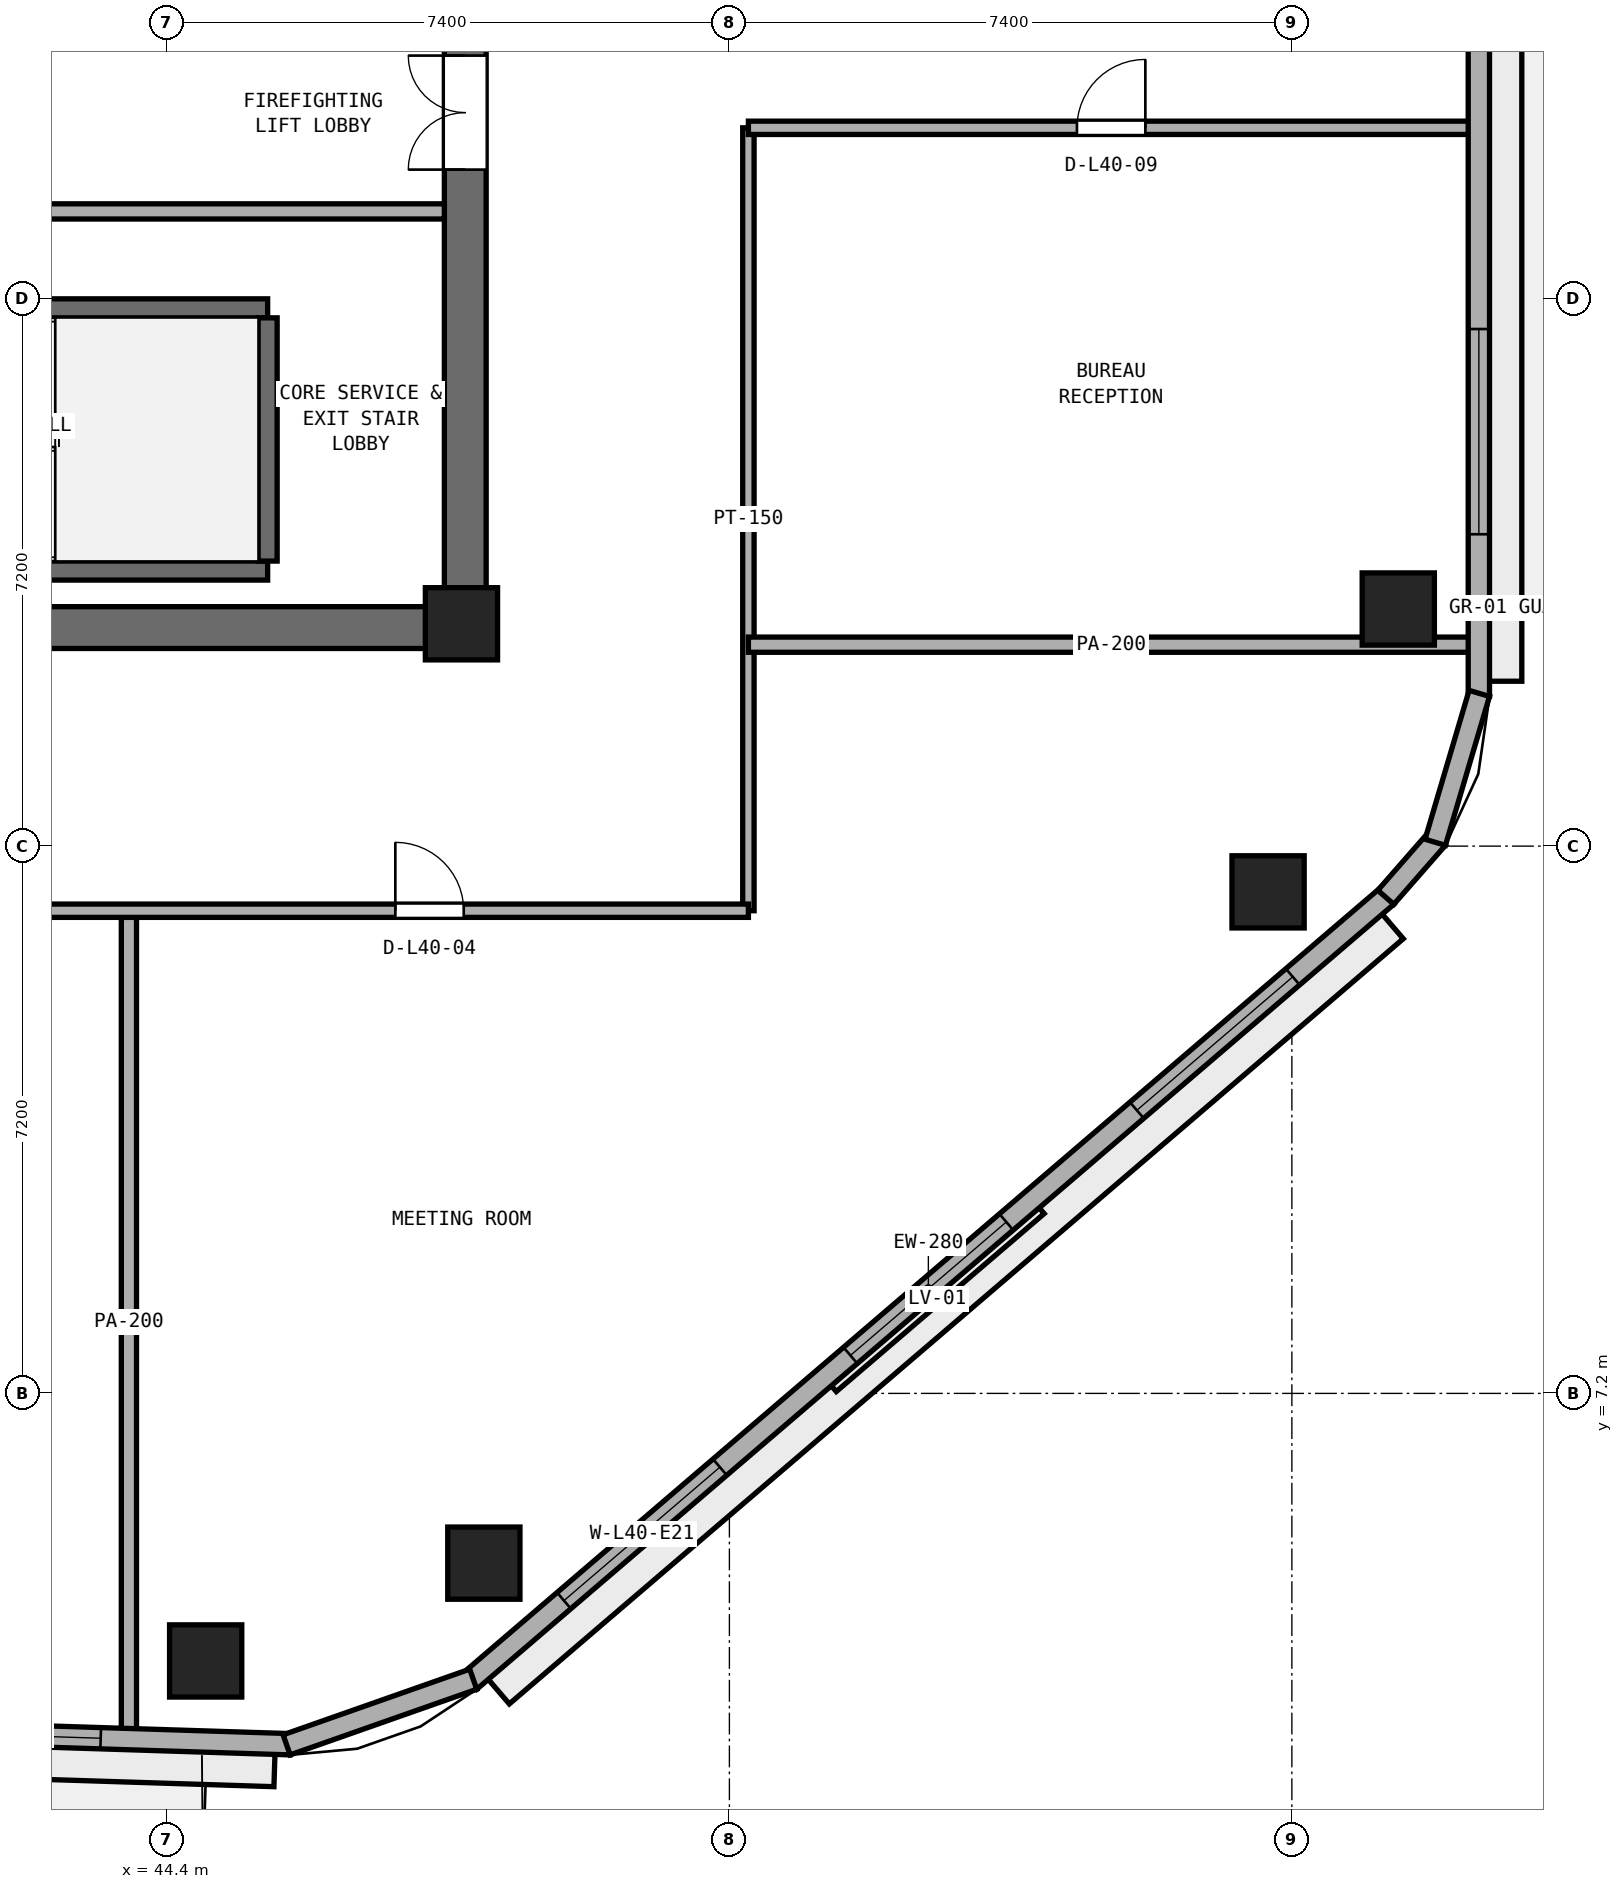
"""IFC4 building model, lengths in metres.
Left out: names, types, materials, properties, quantities, classifications, styles, units other than length and angle.
Written with IfcOpenShell. Run it as: python <this file> out.ifc"""

import sys

from ifc_helpers import new_model, si_unit, direction, frame, frame_2d, origin, origin_2d, place, context, subcontext, project, spatial, rectangle, extrude, element, fill, save


model = new_model("IFC4")
c1 = context("Model", 3, precision=1e-05, world=origin(), true_north=direction((0.0, 1.0)))
c2 = subcontext(c1, "Body", "Model", "MODEL_VIEW")
j1 = project(units=[si_unit("LENGTHUNIT", "METRE"), si_unit("PLANEANGLEUNIT", "RADIAN")], contexts=[c1])
p1 = place(None, origin())
s1 = spatial("IfcSite", under=j1, at=p1, CompositionType="ELEMENT")
p2 = place(p1, origin())
s2 = spatial("IfcBuilding", under=s1, at=p2, CompositionType="ELEMENT")
p3 = place(p2, frame((0.0, 0.0, 159.2)))
s3 = spatial("IfcBuildingStorey", under=s2, at=p3, CompositionType="ELEMENT", Elevation=159.2)
p4 = place(p3, frame((25.4, 17.275, 0.0), z_axis=(0.0, 0.0, 1.0), x_axis=(1.0, 0.0, 0.0)))
e1 = element("IfcWall", 1, at=p4, inside=s3, PredefinedType="SHEAR", context=c2, shape_type="SweptSolid", body=[
    extrude(rectangle(XDim=23.2, YDim=0.55, at=frame_2d((11.6, 0.0))), origin(), (0.0, 0.0, 1.0), 3.54),
])
p5 = place(p3, frame((48.325, 17.55, 0.0), z_axis=(0.0, 0.0, 1.0), x_axis=(0.0, 1.0, 0.0)))
e2 = element("IfcWall", 2, at=p5, inside=s3, PredefinedType="SHEAR", context=c2, shape_type="SweptSolid", body=[
    extrude(rectangle(XDim=15.3, YDim=0.55, at=frame_2d((7.65, 0.0))), origin(), (0.0, 0.0, 1.0), 3.54),
])
p6 = place(p5, frame((5.75, 0.0, 0.0)))
e3 = element("IfcOpeningElement", 3, at=p6, cuts=e2, PredefinedType="OPENING", context=c2, shape_type="SweptSolid", body=[
    extrude(rectangle(XDim=1.5, YDim=2.15, at=frame_2d((0.75, 1.075))), frame((0.0, 0.285, 0.0), z_axis=(0.0, -1.0, 0.0), x_axis=(1.0, 0.0, 0.0)), (0.0, 0.0, 1.0), 0.57),
])
p7 = place(p3, frame((48.275, 17.325, 0.0), z_axis=(0.0, 0.0, 1.0), x_axis=(1.0, 0.0, 0.0)))
e4 = element("IfcColumn", 4, at=p7, inside=s3, PredefinedType="PILASTER", context=c2, shape_type="SweptSolid", body=[
    extrude(rectangle(XDim=0.95, YDim=0.95, at=origin_2d()), origin(), (0.0, 0.0, 1.0), 3.8),
])
for number, where, z_axis, x_axis in (
    (5, (44.91, 3.68, 0.0), (0.0, 0.0, 1.0), (1.0, 0.0, 0.0)),
    (6, (48.57, 4.967, 0.0), (0.0, 0.0, 1.0), (1.0, 0.0, 0.0)),
    (7, (58.887, 13.798, 0.0), (0.0, 0.0, 1.0), (1.0, 0.0, 0.0)),
    (8, (60.6, 17.519, 0.0), (0.0, 0.0, 1.0), (1.0, 0.0, 0.0)),
):
    element("IfcColumn", number, at=place(p3, frame(where, z_axis=z_axis, x_axis=x_axis)), inside=s3, PredefinedType="COLUMN", context=c2, shape_type="SweptSolid", body=[
        extrude(rectangle(XDim=0.95, YDim=0.95, at=origin_2d()), origin(), (0.0, 0.0, 1.0), 3.8),
    ])
for number, where, z_axis, x_axis in (
    (9, (38.425, 18.025, 0.0), (0.0, 0.0, 1.0), (1.0, 0.0, 0.0)),
    (10, (38.425, 21.475, 0.0), (0.0, 0.0, 1.0), (1.0, 0.0, 0.0)),
):
    element("IfcWall", number, at=place(p3, frame(where, z_axis=z_axis, x_axis=x_axis)), inside=s3, PredefinedType="SHEAR", context=c2, shape_type="SweptSolid", body=[
        extrude(rectangle(XDim=7.3, YDim=0.25, at=frame_2d((3.65, 0.0))), origin(), (0.0, 0.0, 1.0), 3.54),
    ])
p8 = place(p3, frame((45.725, 18.15, 0.0), z_axis=(0.0, 0.0, 1.0), x_axis=(0.0, 1.0, 0.0)))
e11 = element("IfcWall", 11, at=p8, inside=s3, PredefinedType="SHEAR", context=c2, shape_type="SweptSolid", body=[
    extrude(rectangle(XDim=3.2, YDim=0.25, at=frame_2d((1.6, 0.0))), origin(), (0.0, 0.0, 1.0), 3.54),
])
p9 = place(p3, frame((42.0, 22.75, 0.0), z_axis=(0.0, 0.0, 1.0), x_axis=(1.0, 0.0, 0.0)))
e12 = element("IfcWall", 12, at=p9, inside=s3, PredefinedType="SOLIDWALL", context=c2, shape_type="SweptSolid", body=[
    extrude(rectangle(XDim=6.05, YDim=0.2, at=frame_2d((3.025, 0.0))), origin(), (0.0, 0.0, 1.0), 3.54),
])
p10 = place(p3, frame((52.05, 13.55, 0.0), z_axis=(0.0, 0.0, 1.0), x_axis=(0.0, 1.0, 0.0)))
e13 = element("IfcWall", 13, at=p10, inside=s3, PredefinedType="PARTITIONING", context=c2, shape_type="SweptSolid", body=[
    extrude(rectangle(XDim=10.3, YDim=0.15, at=frame_2d((5.15, 0.0))), origin(), (0.0, 0.0, 1.0), 3.54),
])
p11 = place(p3, frame((43.9, 2.717, 0.0), z_axis=(0.0, 0.0, 1.0), x_axis=(0.0, 1.0, 0.0)))
e14 = element("IfcWall", 14, at=p11, inside=s3, PredefinedType="PARTITIONING", context=c2, shape_type="SweptSolid", body=[
    extrude(rectangle(XDim=10.833, YDim=0.2, at=frame_2d((5.417, 0.0))), origin(), (0.0, 0.0, 1.0), 3.54),
])
p12 = place(p3, frame((21.95, 13.55, 0.0), z_axis=(0.0, 0.0, 1.0), x_axis=(1.0, 0.0, 0.0)))
e15 = element("IfcWall", 15, at=p12, inside=s3, PredefinedType="PARTITIONING", context=c2, shape_type="SweptSolid", body=[
    extrude(rectangle(XDim=30.1, YDim=0.175, at=frame_2d((15.05, 0.0))), origin(), (0.0, 0.0, 1.0), 3.54),
])
p13 = place(p12, frame((10.645, 0.0, 0.0)))
e16 = element("IfcOpeningElement", 16, at=p13, cuts=e15, PredefinedType="OPENING", context=c2, shape_type="SweptSolid", body=[
    extrude(rectangle(XDim=0.9, YDim=2.1, at=frame_2d((0.45, 1.05))), frame((0.0, 0.097, 0.0), z_axis=(0.0, -1.0, 0.0), x_axis=(1.0, 0.0, 0.0)), (0.0, 0.0, 1.0), 0.195),
])
p14 = place(p12, frame((25.455, 0.0, 0.0)))
e17 = element("IfcOpeningElement", 17, at=p14, cuts=e15, PredefinedType="OPENING", context=c2, shape_type="SweptSolid", body=[
    extrude(rectangle(XDim=0.9, YDim=2.1, at=frame_2d((0.45, 1.05))), frame((0.0, 0.097, 0.0), z_axis=(0.0, -1.0, 0.0), x_axis=(1.0, 0.0, 0.0)), (0.0, 0.0, 1.0), 0.195),
])
p15 = place(p3, frame((52.05, 17.05, 0.0), z_axis=(0.0, 0.0, 1.0), x_axis=(1.0, 0.0, 0.0)))
e18 = element("IfcWall", 18, at=p15, inside=s3, PredefinedType="PARTITIONING", context=c2, shape_type="SweptSolid", body=[
    extrude(rectangle(XDim=9.545, YDim=0.2, at=frame_2d((4.772, 0.0))), origin(), (0.0, 0.0, 1.0), 3.54),
])
p16 = place(p3, frame((52.05, 23.85, 0.0), z_axis=(0.0, 0.0, 1.0), x_axis=(1.0, 0.0, 0.0)))
e19 = element("IfcWall", 19, at=p16, inside=s3, PredefinedType="PARTITIONING", context=c2, shape_type="SweptSolid", body=[
    extrude(rectangle(XDim=9.545, YDim=0.175, at=frame_2d((4.772, 0.0))), origin(), (0.0, 0.0, 1.0), 3.54),
])
p17 = place(p16, frame((4.323, 0.0, 0.0)))
e20 = element("IfcOpeningElement", 20, at=p17, cuts=e19, PredefinedType="OPENING", context=c2, shape_type="SweptSolid", body=[
    extrude(rectangle(XDim=0.9, YDim=2.1, at=frame_2d((0.45, 1.05))), frame((0.0, 0.097, 0.0), z_axis=(0.0, -1.0, 0.0), x_axis=(1.0, 0.0, 0.0)), (0.0, 0.0, 1.0), 0.195),
])
p18 = place(p3, frame((29.625, 3.104, 0.0), z_axis=(0.0, 0.0, 1.0), x_axis=(0.99949718661, -0.031707632487, 0.0)))
e21 = element("IfcWall", 21, at=p18, inside=s3, PredefinedType="STANDARD", context=c2, shape_type="SweptSolid", body=[
    extrude(rectangle(XDim=16.408, YDim=0.28, at=frame_2d((8.204, 0.0))), origin(), (0.0, 0.0, 1.0), 3.54),
])
p19 = place(p18, frame((7.654, 0.0, 0.0)))
e22 = element("IfcOpeningElement", 22, at=p19, cuts=e21, PredefinedType="OPENING", context=c2, shape_type="SweptSolid", body=[
    extrude(rectangle(XDim=1.1, YDim=2.2, at=frame_2d((0.55, 1.1))), frame((0.0, 0.15, 0.0), z_axis=(0.0, -1.0, 0.0), x_axis=(1.0, 0.0, 0.0)), (0.0, 0.0, 1.0), 0.3),
])
p20 = place(p18, frame((1.718, 0.0, 0.9)))
e23 = element("IfcOpeningElement", 23, at=p20, cuts=e21, PredefinedType="OPENING", context=c2, shape_type="SweptSolid", body=[
    extrude(rectangle(XDim=2.7, YDim=1.75, at=frame_2d((1.35, 0.875))), frame((0.0, 0.15, 0.0), z_axis=(0.0, -1.0, 0.0), x_axis=(1.0, 0.0, 0.0)), (0.0, 0.0, 1.0), 0.3),
])
p21 = place(p18, frame((11.21, 0.0, 0.9)))
e24 = element("IfcOpeningElement", 24, at=p21, cuts=e21, PredefinedType="OPENING", context=c2, shape_type="SweptSolid", body=[
    extrude(rectangle(XDim=2.7, YDim=1.75, at=frame_2d((1.35, 0.875))), frame((0.0, 0.15, 0.0), z_axis=(0.0, -1.0, 0.0), x_axis=(1.0, 0.0, 0.0)), (0.0, 0.0, 1.0), 0.3),
])
p22 = place(p3, frame((48.385, 3.414, 0.0), z_axis=(0.0, 0.0, 1.0), x_axis=(0.759700260779, 0.650273414628, 0.0)))
e25 = element("IfcWall", 25, at=p22, inside=s3, PredefinedType="STANDARD", context=c2, shape_type="SweptSolid", body=[
    extrude(rectangle(XDim=15.881, YDim=0.28, at=frame_2d((7.94, 0.0))), origin(), (0.0, 0.0, 1.0), 3.54),
])
p23 = place(p22, frame((1.63, 0.0, 0.9)))
e26 = element("IfcOpeningElement", 26, at=p23, cuts=e25, PredefinedType="OPENING", context=c2, shape_type="SweptSolid", body=[
    extrude(rectangle(XDim=2.7, YDim=1.75, at=frame_2d((1.35, 0.875))), frame((0.0, 0.15, 0.0), z_axis=(0.0, -1.0, 0.0), x_axis=(1.0, 0.0, 0.0)), (0.0, 0.0, 1.0), 0.3),
])
p24 = place(p22, frame((6.59, 0.0, 0.9)))
e27 = element("IfcOpeningElement", 27, at=p24, cuts=e25, PredefinedType="OPENING", context=c2, shape_type="SweptSolid", body=[
    extrude(rectangle(XDim=2.7, YDim=1.75, at=frame_2d((1.35, 0.875))), frame((0.0, 0.15, 0.0), z_axis=(0.0, -1.0, 0.0), x_axis=(1.0, 0.0, 0.0)), (0.0, 0.0, 1.0), 0.3),
])
p25 = place(p22, frame((11.551, 0.0, 0.9)))
e28 = element("IfcOpeningElement", 28, at=p25, cuts=e25, PredefinedType="OPENING", context=c2, shape_type="SweptSolid", body=[
    extrude(rectangle(XDim=2.7, YDim=1.75, at=frame_2d((1.35, 0.875))), frame((0.0, 0.15, 0.0), z_axis=(0.0, -1.0, 0.0), x_axis=(1.0, 0.0, 0.0)), (0.0, 0.0, 1.0), 0.3),
])
p26 = place(p3, frame((61.66, 16.369, 0.0), z_axis=(0.0, 0.0, 1.0), x_axis=(0.0, 1.0, 0.0)))
e29 = element("IfcWall", 29, at=p26, inside=s3, PredefinedType="STANDARD", context=c2, shape_type="SweptSolid", body=[
    extrude(rectangle(XDim=18.902, YDim=0.28, at=frame_2d((9.451, 0.0))), origin(), (0.0, 0.0, 1.0), 3.54),
])
p27 = place(p26, frame((8.601, 0.0, 0.0)))
e30 = element("IfcOpeningElement", 30, at=p27, cuts=e29, PredefinedType="OPENING", context=c2, shape_type="SweptSolid", body=[
    extrude(rectangle(XDim=1.1, YDim=2.2, at=frame_2d((0.55, 1.1))), frame((0.0, 0.15, 0.0), z_axis=(0.0, -1.0, 0.0), x_axis=(1.0, 0.0, 0.0)), (0.0, 0.0, 1.0), 0.3),
])
p28 = place(p26, frame((2.134, 0.0, 0.9)))
e31 = element("IfcOpeningElement", 31, at=p28, cuts=e29, PredefinedType="OPENING", context=c2, shape_type="SweptSolid", body=[
    extrude(rectangle(XDim=2.7, YDim=1.75, at=frame_2d((1.35, 0.875))), frame((0.0, 0.15, 0.0), z_axis=(0.0, -1.0, 0.0), x_axis=(1.0, 0.0, 0.0)), (0.0, 0.0, 1.0), 0.3),
])
p29 = place(p26, frame((14.069, 0.0, 0.9)))
e32 = element("IfcOpeningElement", 32, at=p29, cuts=e29, PredefinedType="OPENING", context=c2, shape_type="SweptSolid", body=[
    extrude(rectangle(XDim=2.7, YDim=1.75, at=frame_2d((1.35, 0.875))), frame((0.0, 0.15, 0.0), z_axis=(0.0, -1.0, 0.0), x_axis=(1.0, 0.0, 0.0)), (0.0, 0.0, 1.0), 0.3),
])
p30 = place(p3, frame((45.975, 2.576, 0.0), z_axis=(0.0, 0.0, 1.0), x_axis=(0.943377643365, 0.331720698781, 0.0)))
e33 = element("IfcWall", 33, at=p30, inside=s3, PredefinedType="STANDARD", context=c2, shape_type="SweptSolid", body=[
    extrude(rectangle(XDim=2.603, YDim=0.28, at=frame_2d((1.301, 0.0))), origin(), (0.0, 0.0, 1.0), 3.54),
])
p31 = place(p3, frame((60.436, 13.727, 0.0), z_axis=(0.0, 0.0, 1.0), x_axis=(0.658571618609, 0.752518055041, 0.0)))
e34 = element("IfcWall", 34, at=p31, inside=s3, PredefinedType="STANDARD", context=c2, shape_type="SweptSolid", body=[
    extrude(rectangle(XDim=1.032, YDim=0.28, at=frame_2d((0.516, 0.0))), origin(), (0.0, 0.0, 1.0), 3.54),
])
p32 = place(p3, frame((61.086, 14.45, 0.0), z_axis=(0.0, 0.0, 1.0), x_axis=(0.283660953453, 0.958924639107, 0.0)))
e35 = element("IfcWall", 35, at=p32, inside=s3, PredefinedType="STANDARD", context=c2, shape_type="SweptSolid", body=[
    extrude(rectangle(XDim=2.042, YDim=0.28, at=frame_2d((1.021, 0.0))), origin(), (0.0, 0.0, 1.0), 3.54),
])
p33 = place(p6, origin())
e36 = element("IfcDoor", 36, at=p33, inside=s3, OperationType="DOUBLE_DOOR_SINGLE_SWING", PredefinedType="DOOR", context=c2, shape_type="SweptSolid", body=[
    extrude(rectangle(XDim=1.5, YDim=2.15, at=frame_2d((0.75, 1.075))), frame((0.0, 0.025, 0.0), z_axis=(0.0, -1.0, 0.0), x_axis=(1.0, 0.0, 0.0)), (0.0, 0.0, 1.0), 0.05),
])
fill(e3, e36)
p34 = place(p14, origin())
e37 = element("IfcDoor", 37, at=p34, inside=s3, OperationType="SINGLE_SWING_LEFT", PredefinedType="DOOR", context=c2, shape_type="SweptSolid", body=[
    extrude(rectangle(XDim=0.9, YDim=2.1, at=frame_2d((0.45, 1.05))), frame((0.0, 0.025, 0.0), z_axis=(0.0, -1.0, 0.0), x_axis=(1.0, 0.0, 0.0)), (0.0, 0.0, 1.0), 0.05),
])
fill(e17, e37)
p35 = place(p17, origin())
e38 = element("IfcDoor", 38, at=p35, inside=s3, OperationType="SINGLE_SWING_RIGHT", PredefinedType="DOOR", context=c2, shape_type="SweptSolid", body=[
    extrude(rectangle(XDim=0.9, YDim=2.1, at=frame_2d((0.45, 1.05))), frame((0.0, 0.025, 0.0), z_axis=(0.0, -1.0, 0.0), x_axis=(1.0, 0.0, 0.0)), (0.0, 0.0, 1.0), 0.05),
])
fill(e20, e38)
p36 = place(p21, origin())
e39 = element("IfcWindow", 39, at=p36, inside=s3, PartitioningType="SINGLE_PANEL", PredefinedType="WINDOW", context=c2, shape_type="SweptSolid", body=[
    extrude(rectangle(XDim=2.7, YDim=1.75, at=frame_2d((1.35, 0.875))), frame((0.0, 0.03, 0.0), z_axis=(0.0, -1.0, 0.0), x_axis=(1.0, 0.0, 0.0)), (0.0, 0.0, 1.0), 0.06),
])
fill(e24, e39)
p37 = place(p23, origin())
e40 = element("IfcWindow", 40, at=p37, inside=s3, PartitioningType="SINGLE_PANEL", PredefinedType="WINDOW", context=c2, shape_type="SweptSolid", body=[
    extrude(rectangle(XDim=2.7, YDim=1.75, at=frame_2d((1.35, 0.875))), frame((0.0, 0.03, 0.0), z_axis=(0.0, -1.0, 0.0), x_axis=(1.0, 0.0, 0.0)), (0.0, 0.0, 1.0), 0.06),
])
fill(e26, e40)
p38 = place(p24, origin())
e41 = element("IfcWindow", 41, at=p38, inside=s3, PartitioningType="SINGLE_PANEL", PredefinedType="WINDOW", context=c2, shape_type="SweptSolid", body=[
    extrude(rectangle(XDim=2.7, YDim=1.75, at=frame_2d((1.35, 0.875))), frame((0.0, 0.03, 0.0), z_axis=(0.0, -1.0, 0.0), x_axis=(1.0, 0.0, 0.0)), (0.0, 0.0, 1.0), 0.06),
])
fill(e27, e41)
p39 = place(p25, origin())
e42 = element("IfcWindow", 42, at=p39, inside=s3, PartitioningType="SINGLE_PANEL", PredefinedType="WINDOW", context=c2, shape_type="SweptSolid", body=[
    extrude(rectangle(XDim=2.7, YDim=1.75, at=frame_2d((1.35, 0.875))), frame((0.0, 0.03, 0.0), z_axis=(0.0, -1.0, 0.0), x_axis=(1.0, 0.0, 0.0)), (0.0, 0.0, 1.0), 0.06),
])
fill(e28, e42)
p40 = place(p28, origin())
e43 = element("IfcWindow", 43, at=p40, inside=s3, PartitioningType="SINGLE_PANEL", PredefinedType="WINDOW", context=c2, shape_type="SweptSolid", body=[
    extrude(rectangle(XDim=2.7, YDim=1.75, at=frame_2d((1.35, 0.875))), frame((0.0, 0.03, 0.0), z_axis=(0.0, -1.0, 0.0), x_axis=(1.0, 0.0, 0.0)), (0.0, 0.0, 1.0), 0.06),
])
fill(e31, e43)
save(model, sys.argv[1])
